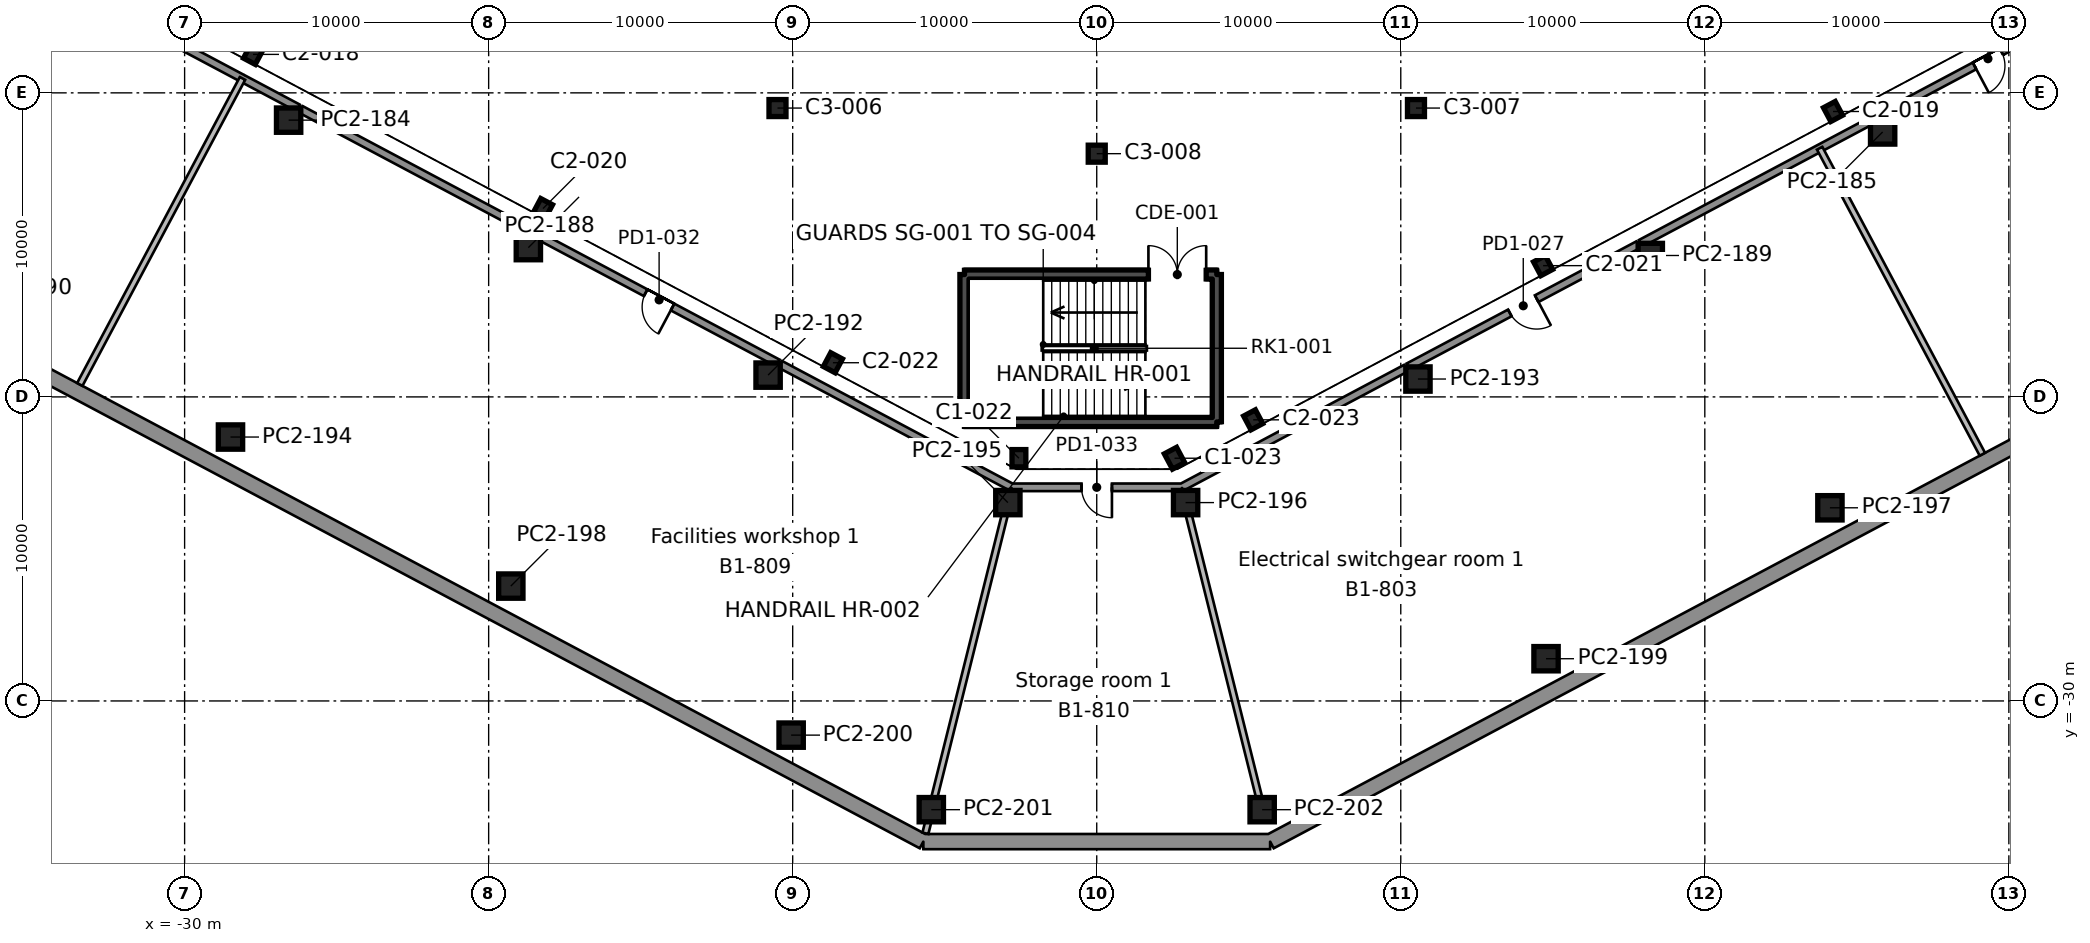
"""IFC4 building model, lengths in metres.
Left out: names, types, materials, properties, quantities, classifications, styles, units other than length and angle.
Written with IfcOpenShell. Run it as: python <this file> out.ifc"""

import sys

from ifc_helpers import new_model, si_unit, direction, frame, frame_2d, origin, origin_2d, place, context, subcontext, project, spatial, rectangle, hollow_rectangle, i_section, extrude, element, fill, save


model = new_model("IFC4")
c1 = context("Model", 3, precision=1e-05, world=origin(), true_north=direction((0.0, 1.0)))
c2 = subcontext(c1, "Body", "Model", "MODEL_VIEW")
j1 = project(units=[si_unit("LENGTHUNIT", "METRE"), si_unit("PLANEANGLEUNIT", "RADIAN")], contexts=[c1])
p1 = place(None, origin())
s1 = spatial("IfcSite", under=j1, at=p1, CompositionType="ELEMENT")
p2 = place(p1, origin())
s2 = spatial("IfcBuilding", under=s1, at=p2, CompositionType="ELEMENT")
p3 = place(p2, frame((0.0, 0.0, -4.5)))
s3 = spatial("IfcBuildingStorey", under=s2, at=p3, CompositionType="ELEMENT", Elevation=-4.5)
for number, where, z_axis, x_axis in (
    (1, (-2.559, -22.017, 0.0), (0.0, 0.0, 1.0), (1.0, 0.0, 0.0)),
    (2, (2.559, -22.017, 0.0), (0.0, 0.0, 1.0), (0.883, 0.469, 0.0)),
):
    element("IfcColumn", number, at=place(p3, frame(where, z_axis=z_axis, x_axis=x_axis)), inside=s3, PredefinedType="COLUMN", context=c2, shape_type="SweptSolid", body=[
        extrude(i_section(OverallWidth=0.455, OverallDepth=0.569, WebThickness=0.078, FlangeThickness=0.125, FilletRadius=0.015, at=origin_2d()), origin(), (0.0, 0.0, 1.0), 4.5),
    ])
for number, where, z_axis, x_axis in (
    (3, (5.146, -20.754, 0.0), (0.0, 0.0, 1.0), (0.883, 0.469, 0.0)),
    (4, (-8.677, -18.876, 0.0), (0.0, 0.0, 1.0), (0.883, -0.469, 0.0)),
    (5, (14.681, -15.683, 0.0), (0.0, 0.0, 1.0), (0.883, 0.469, 0.0)),
    (6, (-18.213, -13.805, 0.0), (0.0, 0.0, 1.0), (0.883, -0.469, 0.0)),
):
    element("IfcColumn", number, at=place(p3, frame(where, z_axis=z_axis, x_axis=x_axis)), inside=s3, PredefinedType="COLUMN", context=c2, shape_type="SweptSolid", body=[
        extrude(i_section(OverallWidth=0.437, OverallDepth=0.513, WebThickness=0.061, FlangeThickness=0.097, FilletRadius=0.015, at=origin_2d()), origin(), (0.0, 0.0, 1.0), 4.5),
    ])
p4 = place(p3, frame((0.0, -12.0, 0.0), z_axis=(0.0, 0.0, 1.0), x_axis=(1.0, 0.0, 0.0)))
e7 = element("IfcColumn", 7, at=p4, inside=s3, PredefinedType="COLUMN", context=c2, shape_type="SweptSolid", body=[
    extrude(hollow_rectangle(XDim=0.559, YDim=0.559, WallThickness=0.024, InnerFilletRadius=0.012, OuterFilletRadius=0.035, at=origin_2d()), origin(), (0.0, 0.0, 1.0), 4.5),
])
p5 = place(p3, frame((24.217, -10.613, 0.0), z_axis=(0.0, 0.0, 1.0), x_axis=(0.882947592859, 0.469471562786, 0.0)))
e8 = element("IfcColumn", 8, at=p5, inside=s3, PredefinedType="COLUMN", context=c2, shape_type="SweptSolid", body=[
    extrude(i_section(OverallWidth=0.437, OverallDepth=0.513, WebThickness=0.061, FlangeThickness=0.097, FilletRadius=0.015, at=origin_2d()), origin(), (0.0, 0.0, 1.0), 4.5),
])
for number, where, z_axis, x_axis in (
    (9, (-10.5, -10.5, 0.0), (0.0, 0.0, 1.0), (1.0, 0.0, 0.0)),
    (10, (10.5, -10.5, 0.0), (0.0, 0.0, 1.0), (1.0, 0.0, 0.0)),
):
    element("IfcColumn", number, at=place(p3, frame(where, z_axis=z_axis, x_axis=x_axis)), inside=s3, PredefinedType="COLUMN", context=c2, shape_type="SweptSolid", body=[
        extrude(hollow_rectangle(XDim=0.559, YDim=0.559, WallThickness=0.024, InnerFilletRadius=0.012, OuterFilletRadius=0.035, at=origin_2d()), origin(), (0.0, 0.0, 1.0), 4.5),
    ])
p6 = place(p3, frame((-27.749, -8.735, 0.0), z_axis=(0.0, 0.0, 1.0), x_axis=(0.882947592859, -0.469471562786, 0.0)))
e11 = element("IfcColumn", 11, at=p6, inside=s3, PredefinedType="COLUMN", context=c2, shape_type="SweptSolid", body=[
    extrude(i_section(OverallWidth=0.437, OverallDepth=0.513, WebThickness=0.061, FlangeThickness=0.097, FilletRadius=0.015, at=origin_2d()), origin(), (0.0, 0.0, 1.0), 4.5),
])
p7 = place(p3, frame((3.95, -15.975, 0.0), z_axis=(0.0, 0.0, 1.0), x_axis=(0.0, -1.0, 0.0)))
e12 = element("IfcWall", 12, at=p7, inside=s3, PredefinedType="SHEAR", context=c2, shape_type="SweptSolid", body=[
    extrude(rectangle(XDim=4.85, YDim=0.3, at=frame_2d((2.425, 0.0))), origin(), (0.0, 0.0, 1.0), 4.5),
])
p8 = place(p3, frame((3.95, -20.825, 0.0), z_axis=(0.0, 0.0, 1.0), x_axis=(-1.0, 0.0, 0.0)))
e13 = element("IfcWall", 13, at=p8, inside=s3, PredefinedType="SHEAR", context=c2, shape_type="SweptSolid", body=[
    extrude(rectangle(XDim=8.3, YDim=0.3, at=frame_2d((4.15, 0.0))), origin(), (0.0, 0.0, 1.0), 4.5),
])
p9 = place(p3, frame((-4.35, -20.825, 0.0), z_axis=(0.0, 0.0, 1.0), x_axis=(0.0, 1.0, 0.0)))
e14 = element("IfcWall", 14, at=p9, inside=s3, PredefinedType="SHEAR", context=c2, shape_type="SweptSolid", body=[
    extrude(rectangle(XDim=4.85, YDim=0.3, at=frame_2d((2.425, 0.0))), origin(), (0.0, 0.0, 1.0), 4.5),
])
p10 = place(p3, frame((-4.35, -15.975, 0.0), z_axis=(0.0, 0.0, 1.0), x_axis=(1.0, 0.0, 0.0)))
e15 = element("IfcWall", 15, at=p10, inside=s3, PredefinedType="SHEAR", context=c2, shape_type="SweptSolid", body=[
    extrude(rectangle(XDim=8.3, YDim=0.3, at=frame_2d((4.15, 0.0))), origin(), (0.0, 0.0, 1.0), 4.5),
])
p11 = place(p10, frame((6.05, 0.0, 0.0)))
e16 = element("IfcOpeningElement", 16, at=p11, cuts=e15, PredefinedType="OPENING", context=c2, shape_type="SweptSolid", body=[
    extrude(rectangle(XDim=1.9, YDim=2.1, at=frame_2d((0.95, 1.05))), frame((0.0, 0.16, 0.0), z_axis=(0.0, -1.0, 0.0), x_axis=(1.0, 0.0, 0.0)), (0.0, 0.0, 1.0), 0.32),
])
p12 = place(p3, frame((5.703, -34.625, 0.0), z_axis=(0.0, 0.0, 1.0), x_axis=(0.882947521781, 0.469471696464, 0.0)))
e17 = element("IfcWall", 17, at=p12, inside=s3, PredefinedType="SOLIDWALL", context=c2, shape_type="SweptSolid", body=[
    extrude(rectangle(XDim=85.294, YDim=0.5, at=frame_2d((42.647, 0.0))), origin(), (0.0, 0.0, 1.0), 4.5),
])
p13 = place(p3, frame((-56.767, -7.475, 0.0), z_axis=(0.0, 0.0, 1.0), x_axis=(0.882947974138, -0.469470845703, 0.0)))
e18 = element("IfcWall", 18, at=p13, inside=s3, PredefinedType="SOLIDWALL", context=c2, shape_type="SweptSolid", body=[
    extrude(rectangle(XDim=57.833, YDim=0.5, at=frame_2d((28.917, 0.0))), origin(), (0.0, 0.0, 1.0), 4.5),
])
p14 = place(p3, frame((-5.703, -34.625, 0.0), z_axis=(0.0, 0.0, 1.0), x_axis=(1.0, 0.0, 0.0)))
e19 = element("IfcWall", 19, at=p14, inside=s3, PredefinedType="SOLIDWALL", context=c2, shape_type="SweptSolid", body=[
    extrude(rectangle(XDim=11.406, YDim=0.5, at=frame_2d((5.703, 0.0))), origin(), (0.0, 0.0, 1.0), 4.5),
])
for number, where, z_axis, x_axis in (
    (20, (-5.441, -33.576, 0.0), (0.0, 0.0, 1.0), (1.0, 0.0, 0.0)),
    (21, (5.441, -33.576, 0.0), (0.0, 0.0, 1.0), (1.0, 0.0, 0.0)),
    (22, (-10.051, -31.124, 0.0), (0.0, 0.0, 1.0), (1.0, 0.0, 0.0)),
    (23, (14.778, -28.611, 0.0), (0.0, 0.0, 1.0), (1.0, 0.0, 0.0)),
    (24, (-19.271, -26.222, 0.0), (0.0, 0.0, 1.0), (1.0, 0.0, 0.0)),
    (25, (24.115, -23.647, 0.0), (0.0, 0.0, 1.0), (1.0, 0.0, 0.0)),
    (26, (-2.923, -23.476, 0.0), (0.0, 0.0, 1.0), (1.0, 0.0, 0.0)),
    (27, (2.923, -23.476, 0.0), (0.0, 0.0, 1.0), (1.0, 0.0, 0.0)),
    (28, (-28.491, -21.32, 0.0), (0.0, 0.0, 1.0), (1.0, 0.0, 0.0)),
    (29, (10.565, -19.412, 0.0), (0.0, 0.0, 1.0), (1.0, 0.0, 0.0)),
    (30, (-10.809, -19.283, 0.0), (0.0, 0.0, 1.0), (1.0, 0.0, 0.0)),
    (31, (18.207, -15.349, 0.0), (0.0, 0.0, 1.0), (1.0, 0.0, 0.0)),
    (32, (-18.694, -15.09, 0.0), (0.0, 0.0, 1.0), (1.0, 0.0, 0.0)),
    (33, (25.849, -11.286, 0.0), (0.0, 0.0, 1.0), (1.0, 0.0, 0.0)),
    (34, (-26.579, -10.897, 0.0), (0.0, 0.0, 1.0), (1.0, 0.0, 0.0)),
):
    element("IfcColumn", number, at=place(p3, frame(where, z_axis=z_axis, x_axis=x_axis)), inside=s3, PredefinedType="COLUMN", context=c2, shape_type="SweptSolid", body=[
        extrude(rectangle(XDim=0.8, YDim=0.8, at=origin_2d()), origin(), (0.0, 0.0, 1.0), 4.05),
    ])
p15 = place(p3, frame((29.129, -21.886, 0.0), z_axis=(0.0, 0.0, 1.0), x_axis=(-0.469474097874, 0.882946244924, 0.0)))
e35 = element("IfcWall", 35, at=p15, inside=s3, PredefinedType="PARTITIONING", context=c2, shape_type="SweptSolid", body=[
    extrude(rectangle(XDim=11.4, YDim=0.2, at=frame_2d((5.7, 0.0))), origin(), (0.0, 0.0, 1.0), 4.05),
])
p16 = place(p3, frame((3.023, -23.876, 0.0), z_axis=(0.0, 0.0, 1.0), x_axis=(0.241930250256, -0.970293643188, 0.0)))
e36 = element("IfcWall", 36, at=p16, inside=s3, PredefinedType="PARTITIONING", context=c2, shape_type="SweptSolid", body=[
    extrude(rectangle(XDim=9.585, YDim=0.2, at=frame_2d((4.792, 0.0))), origin(), (0.0, 0.0, 1.0), 4.05),
])
p17 = place(p3, frame((23.781, -11.819, 0.0), z_axis=(0.0, 0.0, 1.0), x_axis=(-0.882996705644, -0.469379183413, 0.0)))
e37 = element("IfcWall", 37, at=p17, inside=s3, PredefinedType="SOLIDWALL", context=c2, shape_type="SweptSolid", body=[
    extrude(rectangle(XDim=6.668, YDim=0.25, at=frame_2d((3.334, 0.0))), origin(), (0.0, 0.0, 1.0), 4.05),
])
p18 = place(p3, frame((17.807, -14.995, 0.0), z_axis=(0.0, 0.0, 1.0), x_axis=(-0.882988627018, -0.46939438062, 0.0)))
e38 = element("IfcWall", 38, at=p18, inside=s3, PredefinedType="SOLIDWALL", context=c2, shape_type="SweptSolid", body=[
    extrude(rectangle(XDim=8.558, YDim=0.25, at=frame_2d((4.279, 0.0))), origin(), (0.0, 0.0, 1.0), 4.05),
])
p19 = place(p18, frame((3.779, 0.0, 0.0)))
e39 = element("IfcOpeningElement", 39, at=p19, cuts=e38, PredefinedType="OPENING", context=c2, shape_type="SweptSolid", body=[
    extrude(rectangle(XDim=1.0, YDim=2.1, at=frame_2d((0.5, 1.05))), frame((0.0, 0.135, 0.0), z_axis=(0.0, -1.0, 0.0), x_axis=(1.0, 0.0, 0.0)), (0.0, 0.0, 1.0), 0.27),
])
p20 = place(p3, frame((10.165, -19.057, 0.0), z_axis=(0.0, 0.0, 1.0), x_axis=(-0.882987691761, -0.469396139949, 0.0)))
e40 = element("IfcWall", 40, at=p20, inside=s3, PredefinedType="SOLIDWALL", context=c2, shape_type="SweptSolid", body=[
    extrude(rectangle(XDim=8.347, YDim=0.25, at=frame_2d((4.174, 0.0))), origin(), (0.0, 0.0, 1.0), 4.05),
])
p21 = place(p3, frame((33.091, -6.869, 0.0), z_axis=(0.0, 0.0, 1.0), x_axis=(-0.882945366868, -0.469475749243, 0.0)))
e41 = element("IfcWall", 41, at=p21, inside=s3, PredefinedType="SOLIDWALL", context=c2, shape_type="SweptSolid", body=[
    extrude(rectangle(XDim=8.557, YDim=0.25, at=frame_2d((4.279, 0.0))), origin(), (0.0, 0.0, 1.0), 4.05),
])
p22 = place(p21, frame((3.779, 0.0, 0.0)))
e42 = element("IfcOpeningElement", 42, at=p22, cuts=e41, PredefinedType="OPENING", context=c2, shape_type="SweptSolid", body=[
    extrude(rectangle(XDim=1.0, YDim=2.1, at=frame_2d((0.5, 1.05))), frame((0.0, 0.135, 0.0), z_axis=(0.0, -1.0, 0.0), x_axis=(1.0, 0.0, 0.0)), (0.0, 0.0, 1.0), 0.27),
])
p23 = place(p3, frame((25.449, -10.932, 0.0), z_axis=(0.0, 0.0, 1.0), x_axis=(-0.882889505907, -0.469580792153, 0.0)))
e43 = element("IfcWall", 43, at=p23, inside=s3, PredefinedType="SOLIDWALL", context=c2, shape_type="SweptSolid", body=[
    extrude(rectangle(XDim=1.887, YDim=0.25, at=frame_2d((0.944, 0.0))), origin(), (0.0, 0.0, 1.0), 4.05),
])
p24 = place(p3, frame((-33.448, -19.59, 0.0), z_axis=(0.0, 0.0, 1.0), x_axis=(0.469466279335, 0.882950402099, 0.0)))
e44 = element("IfcWall", 44, at=p24, inside=s3, PredefinedType="PARTITIONING", context=c2, shape_type="SweptSolid", body=[
    extrude(rectangle(XDim=11.4, YDim=0.2, at=frame_2d((5.7, 0.0))), origin(), (0.0, 0.0, 1.0), 4.05),
])
p25 = place(p3, frame((-28.092, -9.527, 0.0), z_axis=(0.0, 0.0, 1.0), x_axis=(-0.882951650701, 0.469463931016, 0.0)))
e45 = element("IfcWall", 45, at=p25, inside=s3, PredefinedType="SOLIDWALL", context=c2, shape_type="SweptSolid", body=[
    extrude(rectangle(XDim=6.765, YDim=0.25, at=frame_2d((3.382, 0.0))), origin(), (0.0, 0.0, 1.0), 4.05),
])
p26 = place(p3, frame((-5.635, -34.351, 0.0), z_axis=(0.0, 0.0, 1.0), x_axis=(0.241792832925, 0.970327896098, 0.0)))
e46 = element("IfcWall", 46, at=p26, inside=s3, PredefinedType="PARTITIONING", context=c2, shape_type="SweptSolid", body=[
    extrude(rectangle(XDim=0.387, YDim=0.2, at=frame_2d((0.193, 0.0))), origin(), (0.0, 0.0, 1.0), 4.05),
])
p27 = place(p3, frame((-5.342, -33.176, 0.0), z_axis=(0.0, 0.0, 1.0), x_axis=(0.241930250256, 0.970293643188, 0.0)))
e47 = element("IfcWall", 47, at=p27, inside=s3, PredefinedType="PARTITIONING", context=c2, shape_type="SweptSolid", body=[
    extrude(rectangle(XDim=9.585, YDim=0.2, at=frame_2d((4.792, 0.0))), origin(), (0.0, 0.0, 1.0), 4.05),
])
p28 = place(p3, frame((-2.794, -22.976, 0.0), z_axis=(0.0, 0.0, 1.0), x_axis=(-0.882976758677, 0.469416705749, 0.0)))
e48 = element("IfcWall", 48, at=p28, inside=s3, PredefinedType="SOLIDWALL", context=c2, shape_type="SweptSolid", body=[
    extrude(rectangle(XDim=8.624, YDim=0.25, at=frame_2d((4.312, 0.0))), origin(), (0.0, 0.0, 1.0), 4.05),
])
p29 = place(p3, frame((-10.493, -18.883, 0.0), z_axis=(0.0, 0.0, 1.0), x_axis=(-0.882973285467, 0.469423238828, 0.0)))
e49 = element("IfcWall", 49, at=p29, inside=s3, PredefinedType="SOLIDWALL", context=c2, shape_type="SweptSolid", body=[
    extrude(rectangle(XDim=8.835, YDim=0.25, at=frame_2d((4.417, 0.0))), origin(), (0.0, 0.0, 1.0), 4.05),
])
p30 = place(p29, frame((3.918, 0.0, 0.0)))
e50 = element("IfcOpeningElement", 50, at=p30, cuts=e49, PredefinedType="OPENING", context=c2, shape_type="SweptSolid", body=[
    extrude(rectangle(XDim=1.0, YDim=2.1, at=frame_2d((0.5, 1.05))), frame((0.0, 0.135, 0.0), z_axis=(0.0, -1.0, 0.0), x_axis=(1.0, 0.0, 0.0)), (0.0, 0.0, 1.0), 0.27),
])
p31 = place(p3, frame((-18.38, -14.69, 0.0), z_axis=(0.0, 0.0, 1.0), x_axis=(-0.882975751466, 0.469418600317, 0.0)))
e51 = element("IfcWall", 51, at=p31, inside=s3, PredefinedType="SOLIDWALL", context=c2, shape_type="SweptSolid", body=[
    extrude(rectangle(XDim=8.833, YDim=0.25, at=frame_2d((4.417, 0.0))), origin(), (0.0, 0.0, 1.0), 4.05),
])
p32 = place(p3, frame((-26.267, -10.497, 0.0), z_axis=(0.0, 0.0, 1.0), x_axis=(-0.882964142915, 0.469440435335, 0.0)))
e52 = element("IfcWall", 52, at=p32, inside=s3, PredefinedType="SOLIDWALL", context=c2, shape_type="SweptSolid", body=[
    extrude(rectangle(XDim=2.065, YDim=0.25, at=frame_2d((1.033, 0.0))), origin(), (0.0, 0.0, 1.0), 4.05),
])
p33 = place(p3, frame((2.802, -22.974, 0.0), z_axis=(0.0, 0.0, 1.0), x_axis=(-1.0, 0.0, 0.0)))
e53 = element("IfcWall", 53, at=p33, inside=s3, PredefinedType="SOLIDWALL", context=c2, shape_type="SweptSolid", body=[
    extrude(rectangle(XDim=5.604, YDim=0.25, at=frame_2d((2.802, 0.0))), origin(), (0.0, 0.0, 1.0), 4.05),
])
p34 = place(p33, frame((2.302, 0.0, 0.0)))
e54 = element("IfcOpeningElement", 54, at=p34, cuts=e53, PredefinedType="OPENING", context=c2, shape_type="SweptSolid", body=[
    extrude(rectangle(XDim=1.0, YDim=2.1, at=frame_2d((0.5, 1.05))), frame((0.0, 0.135, 0.0), z_axis=(0.0, -1.0, 0.0), x_axis=(1.0, 0.0, 0.0)), (0.0, 0.0, 1.0), 0.27),
])
p35 = place(p11, origin())
e55 = element("IfcDoor", 55, at=p35, inside=s3, OperationType="DOUBLE_DOOR_SINGLE_SWING", PredefinedType="DOOR", context=c2, shape_type="SweptSolid", body=[
    extrude(rectangle(XDim=1.9, YDim=2.1, at=frame_2d((0.95, 1.05))), frame((0.0, 0.025, 0.0), z_axis=(0.0, -1.0, 0.0), x_axis=(1.0, 0.0, 0.0)), (0.0, 0.0, 1.0), 0.05),
])
fill(e16, e55)
p36 = place(p30, origin())
e56 = element("IfcDoor", 56, at=p36, inside=s3, OperationType="SINGLE_SWING_LEFT", PredefinedType="DOOR", context=c2, shape_type="SweptSolid", body=[
    extrude(rectangle(XDim=1.0, YDim=2.1, at=frame_2d((0.5, 1.05))), frame((0.0, 0.025, 0.0), z_axis=(0.0, -1.0, 0.0), x_axis=(1.0, 0.0, 0.0)), (0.0, 0.0, 1.0), 0.05),
])
fill(e50, e56)
p37 = place(p19, origin())
e57 = element("IfcDoor", 57, at=p37, inside=s3, OperationType="SINGLE_SWING_LEFT", PredefinedType="DOOR", context=c2, shape_type="SweptSolid", body=[
    extrude(rectangle(XDim=1.0, YDim=2.1, at=frame_2d((0.5, 1.05))), frame((0.0, 0.025, 0.0), z_axis=(0.0, -1.0, 0.0), x_axis=(1.0, 0.0, 0.0)), (0.0, 0.0, 1.0), 0.05),
])
fill(e39, e57)
p38 = place(p22, origin())
e58 = element("IfcDoor", 58, at=p38, inside=s3, OperationType="SINGLE_SWING_RIGHT", PredefinedType="DOOR", context=c2, shape_type="SweptSolid", body=[
    extrude(rectangle(XDim=1.0, YDim=2.1, at=frame_2d((0.5, 1.05))), frame((0.0, 0.025, 0.0), z_axis=(0.0, -1.0, 0.0), x_axis=(1.0, 0.0, 0.0)), (0.0, 0.0, 1.0), 0.05),
])
fill(e42, e58)
p39 = place(p34, origin())
e59 = element("IfcDoor", 59, at=p39, inside=s3, OperationType="SINGLE_SWING_LEFT", PredefinedType="DOOR", context=c2, shape_type="SweptSolid", body=[
    extrude(rectangle(XDim=1.0, YDim=2.1, at=frame_2d((0.5, 1.05))), frame((0.0, 0.025, 0.0), z_axis=(0.0, -1.0, 0.0), x_axis=(1.0, 0.0, 0.0)), (0.0, 0.0, 1.0), 0.05),
])
fill(e54, e59)
save(model, sys.argv[1])
